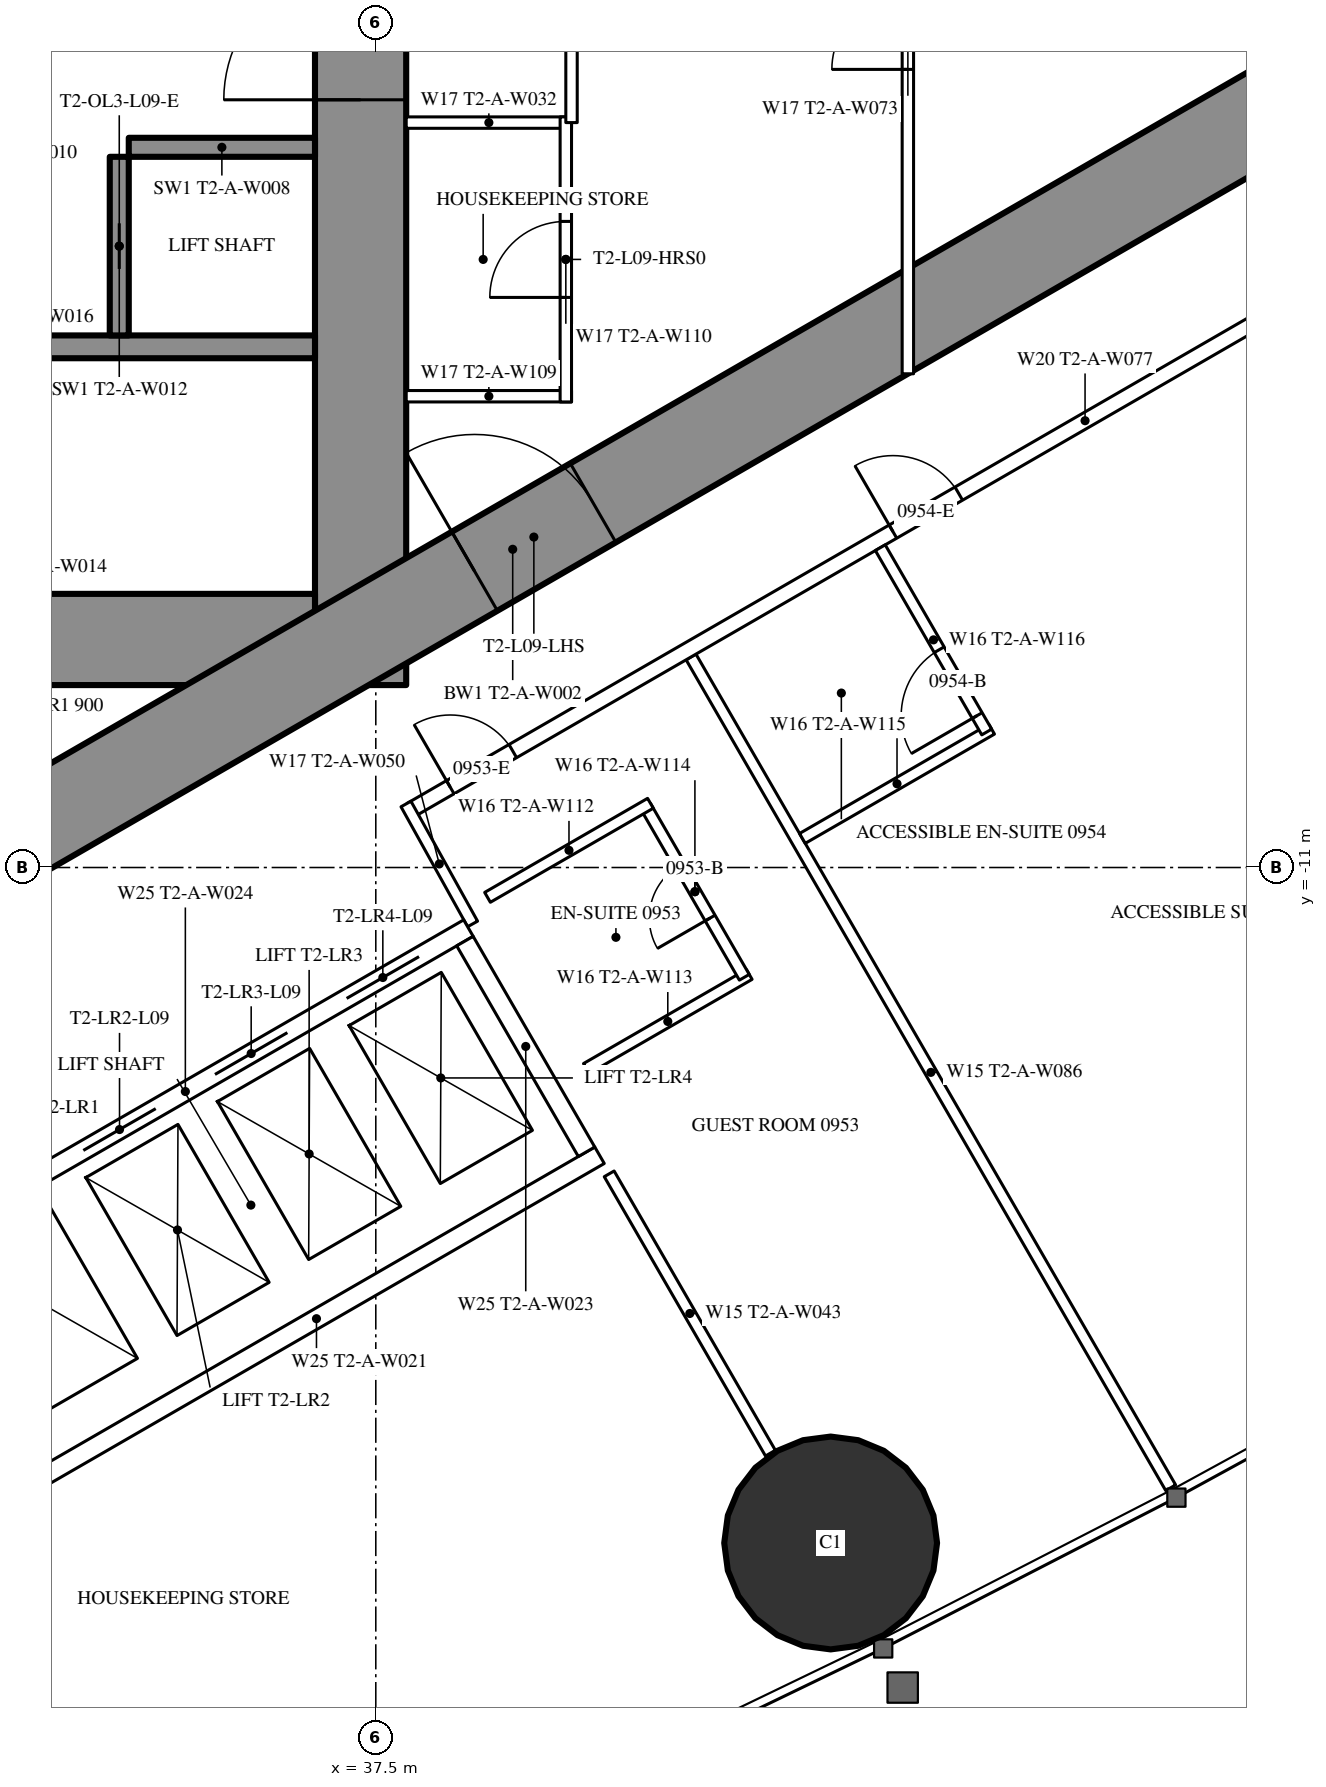
"""IFC4 building model, lengths in metres.
Left out: names, types, materials, properties, quantities, classifications, styles, units other than length and angle.
Written with IfcOpenShell. Run it as: python <this file> out.ifc"""

import sys

from ifc_helpers import new_model, si_unit, direction, frame, frame_2d, origin, origin_2d, place, context, subcontext, project, spatial, rectangle, hollow_circle, extrude, element, fill, save


model = new_model("IFC4")
c1 = context("Model", 3, precision=1e-05, world=origin(), true_north=direction((0.0, 1.0)))
c2 = subcontext(c1, "Body", "Model", "MODEL_VIEW")
j1 = project(units=[si_unit("LENGTHUNIT", "METRE"), si_unit("PLANEANGLEUNIT", "RADIAN")], contexts=[c1])
p1 = place(None, origin())
s1 = spatial("IfcSite", under=j1, at=p1, CompositionType="ELEMENT")
p2 = place(p1, origin())
s2 = spatial("IfcBuilding", under=s1, at=p2, CompositionType="ELEMENT")
p3 = place(p2, frame((0.0, 0.0, 39.0)))
s3 = spatial("IfcBuildingStorey", under=s2, at=p3, CompositionType="ELEMENT", Elevation=39.0)
p4 = place(p3, frame((43.484, -19.886, 0.0), z_axis=(0.0, 0.0, 1.0), x_axis=(1.0, 0.0, 0.0)))
e1 = element("IfcColumn", 1, at=p4, inside=s3, PredefinedType="COLUMN", context=c2, shape_type="SweptSolid", body=[
    extrude(hollow_circle(Radius=1.4, WallThickness=0.12, at=origin_2d()), origin(), (0.0, 0.0, 1.0), 3.5),
])
p5 = place(p3, frame((37.3, -8.6, 0.0), z_axis=(0.0, 0.0, 1.0), x_axis=(0.0, 1.0, 0.0)))
e2 = element("IfcWall", 2, at=p5, inside=s3, PredefinedType="SHEAR", context=c2, shape_type="SweptSolid", body=[
    extrude(rectangle(XDim=17.2, YDim=1.2, at=frame_2d((8.6, 0.0))), origin(), (0.0, 0.0, 1.0), 3.5),
])
p6 = place(p5, frame((7.7, 0.0, 0.0)))
e3 = element("IfcOpeningElement", 3, at=p6, cuts=e2, PredefinedType="OPENING", context=c2, shape_type="SweptSolid", body=[
    extrude(rectangle(XDim=1.8, YDim=2.2, at=frame_2d((0.9, 1.1))), frame((0.0, 0.61, 0.0), z_axis=(0.0, -1.0, 0.0), x_axis=(1.0, 0.0, 0.0)), (0.0, 0.0, 1.0), 1.22),
])
p7 = place(p3, frame((28.3, -8.0, 0.0), z_axis=(0.0, 0.0, 1.0), x_axis=(1.0, 0.0, 0.0)))
e4 = element("IfcWall", 4, at=p7, inside=s3, PredefinedType="SHEAR", context=c2, shape_type="SweptSolid", body=[
    extrude(rectangle(XDim=8.4, YDim=1.2, at=frame_2d((4.2, 0.0))), origin(), (0.0, 0.0, 1.0), 3.5),
])
p8 = place(p7, frame((0.25, 0.0, 0.0)))
e5 = element("IfcOpeningElement", 5, at=p8, cuts=e4, PredefinedType="OPENING", context=c2, shape_type="SweptSolid", body=[
    extrude(rectangle(XDim=1.0, YDim=2.2, at=frame_2d((0.5, 1.1))), frame((0.0, 0.61, 0.0), z_axis=(0.0, -1.0, 0.0), x_axis=(1.0, 0.0, 0.0)), (0.0, 0.0, 1.0), 1.22),
])
p9 = place(p3, frame((28.3, -4.15, 0.0), z_axis=(0.0, 0.0, 1.0), x_axis=(1.0, 0.0, 0.0)))
e6 = element("IfcWall", 6, at=p9, inside=s3, PredefinedType="SHEAR", context=c2, shape_type="SweptSolid", body=[
    extrude(rectangle(XDim=8.4, YDim=0.3, at=frame_2d((4.2, 0.0))), origin(), (0.0, 0.0, 1.0), 3.5),
])
p10 = place(p3, frame((34.125, -4.0, 0.0), z_axis=(0.0, 0.0, 1.0), x_axis=(0.0, 1.0, 0.0)))
e7 = element("IfcWall", 7, at=p10, inside=s3, PredefinedType="SHEAR", context=c2, shape_type="SweptSolid", body=[
    extrude(rectangle(XDim=2.35, YDim=0.25, at=frame_2d((1.175, 0.0))), origin(), (0.0, 0.0, 1.0), 3.5),
])
p11 = place(p10, frame((0.875, 0.0, 0.0)))
e8 = element("IfcOpeningElement", 8, at=p11, cuts=e7, PredefinedType="OPENING", context=c2, shape_type="SweptSolid", body=[
    extrude(rectangle(XDim=0.6, YDim=2.0, at=frame_2d((0.3, 1.0))), frame((0.0, 0.135, 0.0), z_axis=(0.0, -1.0, 0.0), x_axis=(1.0, 0.0, 0.0)), (0.0, 0.0, 1.0), 0.27),
])
p12 = place(p3, frame((34.25, -1.525, 0.0), z_axis=(0.0, 0.0, 1.0), x_axis=(1.0, 0.0, 0.0)))
e9 = element("IfcWall", 9, at=p12, inside=s3, PredefinedType="SHEAR", context=c2, shape_type="SweptSolid", body=[
    extrude(rectangle(XDim=2.45, YDim=0.25, at=frame_2d((1.225, 0.0))), origin(), (0.0, 0.0, 1.0), 3.5),
])
p13 = place(p3, frame((27.2, -13.8, 0.0), z_axis=(0.0, 0.0, 1.0), x_axis=(0.866027159892, 0.499996958321, 0.0)))
e10 = element("IfcWall", 10, at=p13, inside=s3, PredefinedType="SHEAR", context=c2, shape_type="SweptSolid", body=[
    extrude(rectangle(XDim=27.947, YDim=1.2, at=frame_2d((13.973, 0.0))), origin(), (0.0, 0.0, 1.0), 3.5),
])
p14 = place(p13, frame((4.6, 0.0, 0.0)))
e11 = element("IfcOpeningElement", 11, at=p14, cuts=e10, PredefinedType="OPENING", context=c2, shape_type="SweptSolid", body=[
    extrude(rectangle(XDim=1.0, YDim=2.2, at=frame_2d((0.5, 1.1))), frame((0.0, 0.61, 0.0), z_axis=(0.0, -1.0, 0.0), x_axis=(1.0, 0.0, 0.0)), (0.0, 0.0, 1.0), 1.22),
])
p15 = place(p13, frame((13.395, 0.0, 0.0)))
e12 = element("IfcOpeningElement", 12, at=p15, cuts=e10, PredefinedType="OPENING", context=c2, shape_type="SweptSolid", body=[
    extrude(rectangle(XDim=1.8, YDim=2.2, at=frame_2d((0.9, 1.1))), frame((0.0, 0.61, 0.0), z_axis=(0.0, -1.0, 0.0), x_axis=(1.0, 0.0, 0.0)), (0.0, 0.0, 1.0), 1.22),
])
p16 = place(p3, frame((41.647, -8.23, 0.0), z_axis=(0.0, 0.0, 1.0), x_axis=(0.49998590462, -0.866033541603, 0.0)))
e13 = element("IfcWall", 13, at=p16, inside=s3, PredefinedType="PARTITIONING", context=c2, shape_type="SweptSolid", body=[
    extrude(rectangle(XDim=12.621, YDim=0.15, at=frame_2d((6.311, 0.0))), origin(), (0.0, 0.0, 1.0), 3.25),
])
p17 = place(p3, frame((40.57, -15.03, 0.0), z_axis=(0.0, 0.0, 1.0), x_axis=(0.500012993597, -0.866017901798, 0.0)))
e14 = element("IfcWall", 14, at=p17, inside=s3, PredefinedType="PARTITIONING", context=c2, shape_type="SweptSolid", body=[
    extrude(rectangle(XDim=4.243, YDim=0.15, at=frame_2d((2.122, 0.0))), origin(), (0.0, 0.0, 1.0), 3.25),
])
p18 = place(p3, frame((37.96, -10.243, 0.0), z_axis=(0.0, 0.0, 1.0), x_axis=(0.866026429433, 0.499998223521, 0.0)))
e15 = element("IfcWall", 15, at=p18, inside=s3, PredefinedType="PARTITIONING", context=c2, shape_type="SweptSolid", body=[
    extrude(rectangle(XDim=20.487, YDim=0.2, at=frame_2d((10.243, 0.0))), origin(), (0.0, 0.0, 1.0), 3.25),
])
p19 = place(p18, frame((7.325, 0.0, 0.0)))
e16 = element("IfcOpeningElement", 16, at=p19, cuts=e15, PredefinedType="OPENING", context=c2, shape_type="SweptSolid", body=[
    extrude(rectangle(XDim=1.0, YDim=2.2, at=frame_2d((0.5, 1.1))), frame((0.0, 0.11, 0.0), z_axis=(0.0, -1.0, 0.0), x_axis=(1.0, 0.0, 0.0)), (0.0, 0.0, 1.0), 0.22),
])
p20 = place(p18, frame((18.937, 0.0, 0.0)))
e17 = element("IfcOpeningElement", 17, at=p20, cuts=e15, PredefinedType="OPENING", context=c2, shape_type="SweptSolid", body=[
    extrude(rectangle(XDim=0.95, YDim=2.2, at=frame_2d((0.475, 1.1))), frame((0.0, 0.11, 0.0), z_axis=(0.0, -1.0, 0.0), x_axis=(1.0, 0.0, 0.0)), (0.0, 0.0, 1.0), 0.22),
])
p21 = place(p18, frame((0.6, 0.0, 0.0)))
e18 = element("IfcOpeningElement", 18, at=p21, cuts=e15, PredefinedType="OPENING", context=c2, shape_type="SweptSolid", body=[
    extrude(rectangle(XDim=0.95, YDim=2.2, at=frame_2d((0.475, 1.1))), frame((0.0, 0.11, 0.0), z_axis=(0.0, -1.0, 0.0), x_axis=(1.0, 0.0, 0.0)), (0.0, 0.0, 1.0), 0.22),
])
p22 = place(p3, frame((38.773, -11.742, 0.0), z_axis=(0.0, 0.0, 1.0), x_axis=(-0.485528096672, 0.8742210632, 0.0)))
e19 = element("IfcWall", 19, at=p22, inside=s3, PredefinedType="PARTITIONING", context=c2, shape_type="SweptSolid", body=[
    extrude(rectangle(XDim=1.805, YDim=0.15, at=frame_2d((0.903, 0.0))), origin(), (0.0, 0.0, 1.0), 3.25),
])
p23 = place(p3, frame((43.112, -10.617, 0.0), z_axis=(0.0, 0.0, 1.0), x_axis=(0.866018712932, 0.500011588718, 0.0)))
e20 = element("IfcWall", 20, at=p23, inside=s3, PredefinedType="PARTITIONING", context=c2, shape_type="SweptSolid", body=[
    extrude(rectangle(XDim=2.875, YDim=0.15, at=frame_2d((1.438, 0.0))), origin(), (0.0, 0.0, 1.0), 3.25),
])
p24 = place(p3, frame((44.137, -6.792, 0.0), z_axis=(0.0, 0.0, 1.0), x_axis=(0.49994636267, -0.866056369097, 0.0)))
e21 = element("IfcWall", 21, at=p24, inside=s3, PredefinedType="PARTITIONING", context=c2, shape_type="SweptSolid", body=[
    extrude(rectangle(XDim=2.8, YDim=0.15, at=frame_2d((1.4, 0.0))), origin(), (0.0, 0.0, 1.0), 3.25),
])
p25 = place(p24, frame((1.55, 0.0, 0.0)))
e22 = element("IfcOpeningElement", 22, at=p25, cuts=e21, PredefinedType="OPENING", context=c2, shape_type="SweptSolid", body=[
    extrude(rectangle(XDim=1.0, YDim=2.2, at=frame_2d((0.5, 1.1))), frame((0.0, 0.085, 0.0), z_axis=(0.0, -1.0, 0.0), x_axis=(1.0, 0.0, 0.0)), (0.0, 0.0, 1.0), 0.17),
])
p26 = place(p3, frame((40.27, -13.644, 0.0), z_axis=(0.0, 0.0, 1.0), x_axis=(0.866031185235, 0.4999899861, 0.0)))
e23 = element("IfcWall", 23, at=p26, inside=s3, PredefinedType="PARTITIONING", context=c2, shape_type="SweptSolid", body=[
    extrude(rectangle(XDim=2.475, YDim=0.15, at=frame_2d((1.238, 0.0))), origin(), (0.0, 0.0, 1.0), 3.25),
])
p27 = place(p3, frame((41.048, -10.193, 0.0), z_axis=(0.0, 0.0, 1.0), x_axis=(0.500047596559, -0.865997922154, 0.0)))
e24 = element("IfcWall", 24, at=p27, inside=s3, PredefinedType="PARTITIONING", context=c2, shape_type="SweptSolid", body=[
    extrude(rectangle(XDim=2.6, YDim=0.15, at=frame_2d((1.3, 0.0))), origin(), (0.0, 0.0, 1.0), 3.25),
])
p28 = place(p27, frame((0.9, 0.0, 0.0)))
e25 = element("IfcOpeningElement", 25, at=p28, cuts=e24, PredefinedType="OPENING", context=c2, shape_type="SweptSolid", body=[
    extrude(rectangle(XDim=0.8, YDim=2.2, at=frame_2d((0.4, 1.1))), frame((0.0, 0.085, 0.0), z_axis=(0.0, -1.0, 0.0), x_axis=(1.0, 0.0, 0.0)), (0.0, 0.0, 1.0), 0.17),
])
p29 = place(p3, frame((38.97, -11.393, 0.0), z_axis=(0.0, 0.0, 1.0), x_axis=(0.866031185235, 0.4999899861, 0.0)))
e26 = element("IfcWall", 26, at=p29, inside=s3, PredefinedType="PARTITIONING", context=c2, shape_type="SweptSolid", body=[
    extrude(rectangle(XDim=2.475, YDim=0.15, at=frame_2d((1.238, 0.0))), origin(), (0.0, 0.0, 1.0), 3.25),
])
for number, where, z_axis, x_axis in (
    (27, (37.9, -1.2, 0.0), (0.0, 0.0, 1.0), (1.0, 0.0, 0.0)),
    (28, (37.9, -4.8, 0.0), (0.0, 0.0, 1.0), (1.0, 0.0, 0.0)),
):
    element("IfcWall", number, at=place(p3, frame(where, z_axis=z_axis, x_axis=x_axis)), inside=s3, PredefinedType="PARTITIONING", context=c2, shape_type="SweptSolid", body=[
        extrude(rectangle(XDim=2.175, YDim=0.15, at=frame_2d((1.087, 0.0))), origin(), (0.0, 0.0, 1.0), 3.25),
    ])
p30 = place(p3, frame((40.0, -4.875, 0.0), z_axis=(0.0, 0.0, 1.0), x_axis=(0.0, 1.0, 0.0)))
e29 = element("IfcWall", 29, at=p30, inside=s3, PredefinedType="PARTITIONING", context=c2, shape_type="SweptSolid", body=[
    extrude(rectangle(XDim=3.75, YDim=0.15, at=frame_2d((1.875, 0.0))), origin(), (0.0, 0.0, 1.0), 3.25),
])
p31 = place(p30, frame((1.375, 0.0, 0.0)))
e30 = element("IfcOpeningElement", 30, at=p31, cuts=e29, PredefinedType="OPENING", context=c2, shape_type="SweptSolid", body=[
    extrude(rectangle(XDim=1.0, YDim=2.2, at=frame_2d((0.5, 1.1))), frame((0.0, 0.085, 0.0), z_axis=(0.0, -1.0, 0.0), x_axis=(1.0, 0.0, 0.0)), (0.0, 0.0, 1.0), 0.17),
])
p32 = place(p3, frame((40.075, -1.2, 0.0), z_axis=(0.0, 0.0, 1.0), x_axis=(0.0, 1.0, 0.0)))
e31 = element("IfcWall", 31, at=p32, inside=s3, PredefinedType="PARTITIONING", context=c2, shape_type="SweptSolid", body=[
    extrude(rectangle(XDim=6.874, YDim=0.15, at=frame_2d((3.437, 0.0))), origin(), (0.0, 0.0, 1.0), 3.25),
])
p33 = place(p32, frame((2.537, 0.0, 0.0)))
e32 = element("IfcOpeningElement", 32, at=p33, cuts=e31, PredefinedType="OPENING", context=c2, shape_type="SweptSolid", body=[
    extrude(rectangle(XDim=1.8, YDim=2.2, at=frame_2d((0.9, 1.1))), frame((0.0, 0.085, 0.0), z_axis=(0.0, -1.0, 0.0), x_axis=(1.0, 0.0, 0.0)), (0.0, 0.0, 1.0), 0.17),
])
p34 = place(p3, frame((44.5, -4.505, 0.0), z_axis=(0.0, 0.0, 1.0), x_axis=(0.0, 1.0, 0.0)))
e33 = element("IfcWall", 33, at=p34, inside=s3, PredefinedType="PARTITIONING", context=c2, shape_type="SweptSolid", body=[
    extrude(rectangle(XDim=9.009, YDim=0.15, at=frame_2d((4.505, 0.0))), origin(), (0.0, 0.0, 1.0), 2.45),
])
p35 = place(p34, frame((4.005, 0.0, 0.0)))
e34 = element("IfcOpeningElement", 34, at=p35, cuts=e33, PredefinedType="OPENING", context=c2, shape_type="SweptSolid", body=[
    extrude(rectangle(XDim=1.0, YDim=2.2, at=frame_2d((0.5, 1.1))), frame((0.0, 0.085, 0.0), z_axis=(0.0, -1.0, 0.0), x_axis=(1.0, 0.0, 0.0)), (0.0, 0.0, 1.0), 0.17),
])
p36 = place(p3, frame((31.271, -16.097, 0.0), z_axis=(0.0, 0.0, 1.0), x_axis=(0.86604045752, 0.499973925258, 0.0)))
e35 = element("IfcWall", 35, at=p36, inside=s3, PredefinedType="PARTITIONING", context=c2, shape_type="SweptSolid", body=[
    extrude(rectangle(XDim=8.6, YDim=0.25, at=frame_2d((4.3, 0.0))), origin(), (0.0, 0.0, 1.0), 3.25),
])
p37 = place(p36, frame((0.75, 0.0, 0.0)))
e36 = element("IfcOpeningElement", 36, at=p37, cuts=e35, PredefinedType="OPENING", context=c2, shape_type="SweptSolid", body=[
    extrude(rectangle(XDim=1.1, YDim=2.2, at=frame_2d((0.55, 1.1))), frame((0.0, 0.135, 0.0), z_axis=(0.0, -1.0, 0.0), x_axis=(1.0, 0.0, 0.0)), (0.0, 0.0, 1.0), 0.27),
])
p38 = place(p36, frame((2.75, 0.0, 0.0)))
e37 = element("IfcOpeningElement", 37, at=p38, cuts=e35, PredefinedType="OPENING", context=c2, shape_type="SweptSolid", body=[
    extrude(rectangle(XDim=1.1, YDim=2.2, at=frame_2d((0.55, 1.1))), frame((0.0, 0.135, 0.0), z_axis=(0.0, -1.0, 0.0), x_axis=(1.0, 0.0, 0.0)), (0.0, 0.0, 1.0), 0.27),
])
p39 = place(p36, frame((4.75, 0.0, 0.0)))
e38 = element("IfcOpeningElement", 38, at=p39, cuts=e35, PredefinedType="OPENING", context=c2, shape_type="SweptSolid", body=[
    extrude(rectangle(XDim=1.1, YDim=2.2, at=frame_2d((0.55, 1.1))), frame((0.0, 0.135, 0.0), z_axis=(0.0, -1.0, 0.0), x_axis=(1.0, 0.0, 0.0)), (0.0, 0.0, 1.0), 0.27),
])
p40 = place(p36, frame((6.75, 0.0, 0.0)))
e39 = element("IfcOpeningElement", 39, at=p40, cuts=e35, PredefinedType="OPENING", context=c2, shape_type="SweptSolid", body=[
    extrude(rectangle(XDim=1.1, YDim=2.2, at=frame_2d((0.55, 1.1))), frame((0.0, 0.135, 0.0), z_axis=(0.0, -1.0, 0.0), x_axis=(1.0, 0.0, 0.0)), (0.0, 0.0, 1.0), 0.27),
])
p41 = place(p3, frame((32.996, -19.086, 0.0), z_axis=(0.0, 0.0, 1.0), x_axis=(0.866028165386, 0.499995216735, 0.0)))
e40 = element("IfcWall", 40, at=p41, inside=s3, PredefinedType="PARTITIONING", context=c2, shape_type="SweptSolid", body=[
    extrude(rectangle(XDim=8.6, YDim=0.25, at=frame_2d((4.3, 0.0))), origin(), (0.0, 0.0, 1.0), 3.25),
])
p42 = place(p3, frame((38.673, -11.968, 0.0), z_axis=(0.0, 0.0, 1.0), x_axis=(0.499929347863, -0.866066190972, 0.0)))
e41 = element("IfcWall", 41, at=p42, inside=s3, PredefinedType="PARTITIONING", context=c2, shape_type="SweptSolid", body=[
    extrude(rectangle(XDim=3.201, YDim=0.25, at=frame_2d((1.6, 0.0))), origin(), (0.0, 0.0, 1.0), 3.25),
])
p43 = place(p25, origin())
e42 = element("IfcDoor", 42, at=p43, inside=s3, OperationType="SINGLE_SWING_RIGHT", PredefinedType="DOOR", context=c2, shape_type="SweptSolid", body=[
    extrude(rectangle(XDim=1.0, YDim=2.2, at=frame_2d((0.5, 1.1))), frame((0.0, 0.025, 0.0), z_axis=(0.0, -1.0, 0.0), x_axis=(1.0, 0.0, 0.0)), (0.0, 0.0, 1.0), 0.05),
])
fill(e22, e42)
p44 = place(p19, origin())
e43 = element("IfcDoor", 43, at=p44, inside=s3, OperationType="SINGLE_SWING_LEFT", PredefinedType="DOOR", context=c2, shape_type="SweptSolid", body=[
    extrude(rectangle(XDim=1.0, YDim=2.2, at=frame_2d((0.5, 1.1))), frame((0.0, 0.025, 0.0), z_axis=(0.0, -1.0, 0.0), x_axis=(1.0, 0.0, 0.0)), (0.0, 0.0, 1.0), 0.05),
])
fill(e16, e43)
p45 = place(p28, origin())
e44 = element("IfcDoor", 44, at=p45, inside=s3, OperationType="SINGLE_SWING_RIGHT", PredefinedType="DOOR", context=c2, shape_type="SweptSolid", body=[
    extrude(rectangle(XDim=0.8, YDim=2.2, at=frame_2d((0.4, 1.1))), frame((0.0, 0.025, 0.0), z_axis=(0.0, -1.0, 0.0), x_axis=(1.0, 0.0, 0.0)), (0.0, 0.0, 1.0), 0.05),
])
fill(e25, e44)
p46 = place(p21, origin())
e45 = element("IfcDoor", 45, at=p46, inside=s3, OperationType="SINGLE_SWING_LEFT", PredefinedType="DOOR", context=c2, shape_type="SweptSolid", body=[
    extrude(rectangle(XDim=0.95, YDim=2.2, at=frame_2d((0.475, 1.1))), frame((0.0, 0.025, 0.0), z_axis=(0.0, -1.0, 0.0), x_axis=(1.0, 0.0, 0.0)), (0.0, 0.0, 1.0), 0.05),
])
fill(e18, e45)
p47 = place(p31, origin())
e46 = element("IfcDoor", 46, at=p47, inside=s3, OperationType="SINGLE_SWING_LEFT", PredefinedType="DOOR", context=c2, shape_type="SweptSolid", body=[
    extrude(rectangle(XDim=1.0, YDim=2.2, at=frame_2d((0.5, 1.1))), frame((0.0, 0.025, 0.0), z_axis=(0.0, -1.0, 0.0), x_axis=(1.0, 0.0, 0.0)), (0.0, 0.0, 1.0), 0.05),
])
fill(e30, e46)
p48 = place(p35, origin())
e47 = element("IfcDoor", 47, at=p48, inside=s3, OperationType="SINGLE_SWING_LEFT", PredefinedType="DOOR", context=c2, shape_type="SweptSolid", body=[
    extrude(rectangle(XDim=1.0, YDim=2.2, at=frame_2d((0.5, 1.1))), frame((0.0, 0.025, 0.0), z_axis=(0.0, -1.0, 0.0), x_axis=(1.0, 0.0, 0.0)), (0.0, 0.0, 1.0), 0.05),
])
fill(e34, e47)
p49 = place(p15, origin())
e48 = element("IfcDoor", 48, at=p49, inside=s3, OperationType="DOUBLE_DOOR_SINGLE_SWING", PredefinedType="DOOR", context=c2, shape_type="SweptSolid", body=[
    extrude(rectangle(XDim=1.8, YDim=2.2, at=frame_2d((0.9, 1.1))), frame((0.0, 0.025, 0.0), z_axis=(0.0, -1.0, 0.0), x_axis=(1.0, 0.0, 0.0)), (0.0, 0.0, 1.0), 0.05),
])
fill(e12, e48)
p50 = place(p6, origin())
e49 = element("IfcDoor", 49, at=p50, inside=s3, OperationType="DOUBLE_DOOR_SINGLE_SWING", PredefinedType="DOOR", context=c2, shape_type="SweptSolid", body=[
    extrude(rectangle(XDim=1.8, YDim=2.2, at=frame_2d((0.9, 1.1))), frame((0.0, 0.025, 0.0), z_axis=(0.0, -1.0, 0.0), x_axis=(1.0, 0.0, 0.0)), (0.0, 0.0, 1.0), 0.05),
])
fill(e3, e49)
p51 = place(p11, origin())
e50 = element("IfcDoor", 50, at=p51, inside=s3, OperationType="SLIDING_TO_LEFT", PredefinedType="DOOR", context=c2, shape_type="SweptSolid", body=[
    extrude(rectangle(XDim=0.6, YDim=2.0, at=frame_2d((0.3, 1.0))), frame((0.0, 0.025, 0.0), z_axis=(0.0, -1.0, 0.0), x_axis=(1.0, 0.0, 0.0)), (0.0, 0.0, 1.0), 0.05),
])
fill(e8, e50)
p52 = place(p38, origin())
e51 = element("IfcDoor", 51, at=p52, inside=s3, OperationType="DOUBLE_DOOR_SLIDING", PredefinedType="USERDEFINED", context=c2, shape_type="SweptSolid", body=[
    extrude(rectangle(XDim=1.1, YDim=2.2, at=frame_2d((0.55, 1.1))), frame((0.0, 0.025, 0.0), z_axis=(0.0, -1.0, 0.0), x_axis=(1.0, 0.0, 0.0)), (0.0, 0.0, 1.0), 0.05),
])
fill(e37, e51)
p53 = place(p39, origin())
e52 = element("IfcDoor", 52, at=p53, inside=s3, OperationType="DOUBLE_DOOR_SLIDING", PredefinedType="USERDEFINED", context=c2, shape_type="SweptSolid", body=[
    extrude(rectangle(XDim=1.1, YDim=2.2, at=frame_2d((0.55, 1.1))), frame((0.0, 0.025, 0.0), z_axis=(0.0, -1.0, 0.0), x_axis=(1.0, 0.0, 0.0)), (0.0, 0.0, 1.0), 0.05),
])
fill(e38, e52)
p54 = place(p40, origin())
e53 = element("IfcDoor", 53, at=p54, inside=s3, OperationType="DOUBLE_DOOR_SLIDING", PredefinedType="USERDEFINED", context=c2, shape_type="SweptSolid", body=[
    extrude(rectangle(XDim=1.1, YDim=2.2, at=frame_2d((0.55, 1.1))), frame((0.0, 0.025, 0.0), z_axis=(0.0, -1.0, 0.0), x_axis=(1.0, 0.0, 0.0)), (0.0, 0.0, 1.0), 0.05),
])
fill(e39, e53)
save(model, sys.argv[1])
